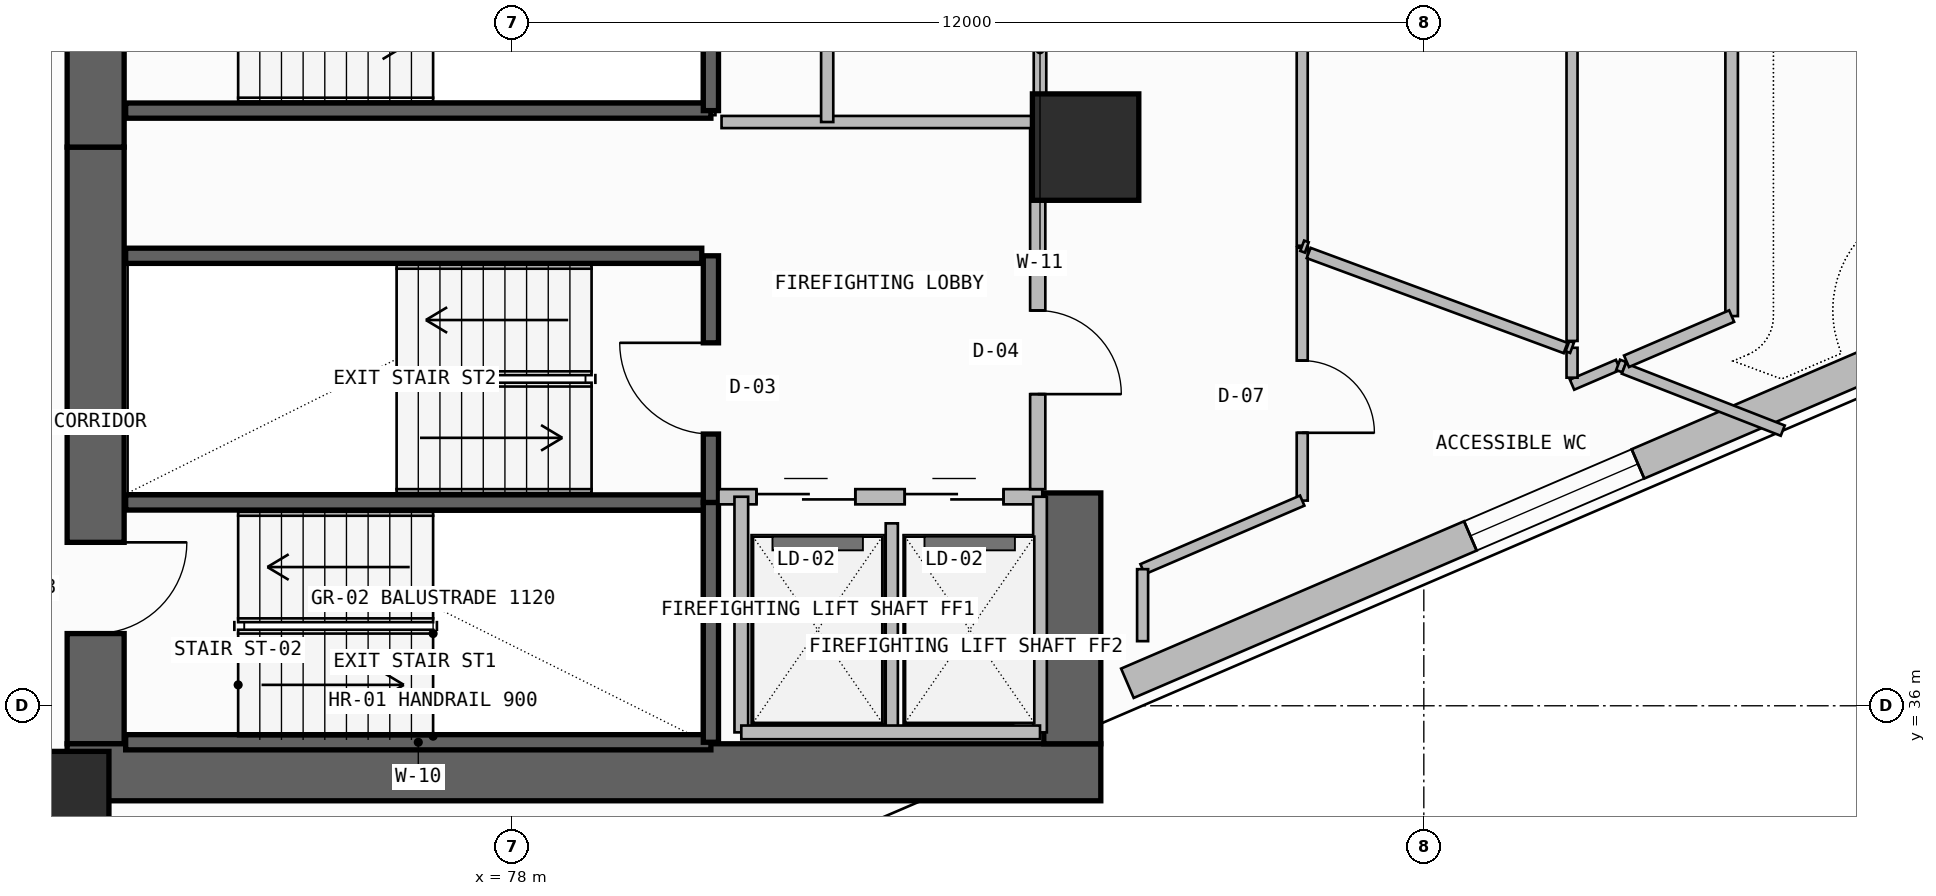
"""IFC4 building model, lengths in metres.
Left out: names, types, materials, properties, quantities, classifications, styles, units other than length and angle.
Written with IfcOpenShell. Run it as: python <this file> out.ifc"""

import sys

from ifc_helpers import new_model, si_unit, direction, frame, frame_2d, origin, origin_2d, place, context, subcontext, project, spatial, rectangle, extrude, element, fill, save


model = new_model("IFC4")
c1 = context("Model", 3, precision=1e-05, world=origin(), true_north=direction((0.0, 1.0)))
c2 = subcontext(c1, "Body", "Model", "MODEL_VIEW")
j1 = project(units=[si_unit("LENGTHUNIT", "METRE"), si_unit("PLANEANGLEUNIT", "RADIAN")], contexts=[c1])
p1 = place(None, origin())
s1 = spatial("IfcSite", under=j1, at=p1, CompositionType="ELEMENT")
p2 = place(p1, origin())
s2 = spatial("IfcBuilding", under=s1, at=p2, CompositionType="ELEMENT")
p3 = place(p2, frame((0.0, 0.0, 182.62)))
s3 = spatial("IfcBuildingStorey", under=s2, at=p3, CompositionType="ELEMENT", Elevation=182.62)
p4 = place(p3, frame((72.525, 35.5, -0.26), z_axis=(0.0, 0.0, 1.0), x_axis=(0.0, 1.0, 0.0)))
e1 = element("IfcWall", 1, at=p4, inside=s3, PredefinedType="SHEAR", context=c2, shape_type="SweptSolid", body=[
    extrude(rectangle(XDim=7.85, YDim=0.75, at=frame_2d((3.925, 0.0))), origin(), (0.0, 0.0, 1.0), 3.52),
])
p5 = place(p4, frame((1.45, 0.0, 0.26)))
e2 = element("IfcOpeningElement", 2, at=p5, cuts=e1, PredefinedType="OPENING", context=c2, shape_type="SweptSolid", body=[
    extrude(rectangle(XDim=1.2, YDim=2.2, at=frame_2d((0.6, 1.1))), frame((0.0, 0.385, 0.0), z_axis=(0.0, -1.0, 0.0), x_axis=(1.0, 0.0, 0.0)), (0.0, 0.0, 1.0), 0.77),
])
p6 = place(p3, frame((72.15, 35.125, -0.26), z_axis=(0.0, 0.0, 1.0), x_axis=(1.0, 0.0, 0.0)))
e3 = element("IfcWall", 3, at=p6, inside=s3, PredefinedType="SHEAR", context=c2, shape_type="SweptSolid", body=[
    extrude(rectangle(XDim=13.6, YDim=0.75, at=frame_2d((6.8, 0.0))), origin(), (0.0, 0.0, 1.0), 3.52),
])
p7 = place(p3, frame((85.375, 35.5, -0.26), z_axis=(0.0, 0.0, 1.0), x_axis=(0.0, 1.0, 0.0)))
e4 = element("IfcWall", 4, at=p7, inside=s3, PredefinedType="SHEAR", context=c2, shape_type="SweptSolid", body=[
    extrude(rectangle(XDim=3.3, YDim=0.75, at=frame_2d((1.65, 0.0))), origin(), (0.0, 0.0, 1.0), 3.52),
])
p8 = place(p3, frame((72.525, 43.35, -0.26), z_axis=(0.0, 0.0, 1.0), x_axis=(0.0, 1.0, 0.0)))
e5 = element("IfcWall", 5, at=p8, inside=s3, PredefinedType="SHEAR", context=c2, shape_type="SweptSolid", body=[
    extrude(rectangle(XDim=12.7, YDim=0.75, at=frame_2d((6.35, 0.0))), origin(), (0.0, 0.0, 1.0), 3.52),
])
p9 = place(p8, frame((1.35, 0.0, 0.26)))
e6 = element("IfcOpeningElement", 6, at=p9, cuts=e5, PredefinedType="OPENING", context=c2, shape_type="SweptSolid", body=[
    extrude(rectangle(XDim=1.2, YDim=2.2, at=frame_2d((0.6, 1.1))), frame((0.0, 0.385, 0.0), z_axis=(0.0, -1.0, 0.0), x_axis=(1.0, 0.0, 0.0)), (0.0, 0.0, 1.0), 0.77),
])
for number, where, z_axis, x_axis in (
    (7, (72.0, 34.7, 0.0), (0.0, 0.0, 1.0), (1.0, 0.0, 0.0)),
    (8, (85.55, 43.35, 0.0), (0.0, 0.0, 1.0), (1.0, 0.0, 0.0)),
):
    element("IfcColumn", number, at=place(p3, frame(where, z_axis=z_axis, x_axis=x_axis)), inside=s3, PredefinedType="COLUMN", context=c2, shape_type="SweptSolid", body=[
        extrude(rectangle(XDim=1.4, YDim=1.4, at=origin_2d()), origin(), (0.0, 0.0, 1.0), 3.52),
    ])
p10 = place(p3, frame((86.1, 36.296, 0.0), z_axis=(0.0, 0.0, 1.0), x_axis=(0.918792412723, 0.394741057306, 0.0)))
e9 = element("IfcWall", 9, at=p10, inside=s3, PredefinedType="SOLIDWALL", context=c2, shape_type="SweptSolid", body=[
    extrude(rectangle(XDim=11.794, YDim=0.42, at=frame_2d((5.897, 0.0))), origin(), (0.0, 0.0, 1.0), 2.245),
])
p11 = place(p10, frame((4.911, 0.0, 1.2)))
e10 = element("IfcOpeningElement", 10, at=p11, cuts=e9, PredefinedType="OPENING", context=c2, shape_type="SweptSolid", body=[
    extrude(rectangle(XDim=2.4, YDim=0.9, at=frame_2d((1.2, 0.45))), frame((0.0, 0.22, 0.0), z_axis=(0.0, -1.0, 0.0), x_axis=(1.0, 0.0, 0.0)), (0.0, 0.0, 1.0), 0.44),
])
for number, where, z_axis, x_axis in (
    (11, (72.92, 35.52, -0.26), (0.0, 0.0, 1.0), (1.0, 0.0, 0.0)),
    (12, (72.92, 38.675, -0.26), (0.0, 0.0, 1.0), (1.0, 0.0, 0.0)),
):
    element("IfcWall", number, at=place(p3, frame(where, z_axis=z_axis, x_axis=x_axis)), inside=s3, PredefinedType="SOLIDWALL", context=c2, shape_type="SweptSolid", body=[
        extrude(rectangle(XDim=7.7, YDim=0.2, at=frame_2d((3.85, 0.0))), origin(), (0.0, 0.0, 1.0), 3.52),
    ])
p12 = place(p3, frame((80.62, 35.52, -0.26), z_axis=(0.0, 0.0, 1.0), x_axis=(0.0, 1.0, 0.0)))
e13 = element("IfcWall", 13, at=p12, inside=s3, PredefinedType="SOLIDWALL", context=c2, shape_type="SweptSolid", body=[
    extrude(rectangle(XDim=3.155, YDim=0.2, at=frame_2d((1.578, 0.0))), origin(), (0.0, 0.0, 1.0), 3.52),
])
p13 = place(p3, frame((80.62, 38.675, -0.26), z_axis=(0.0, 0.0, 1.0), x_axis=(0.0, 1.0, 0.0)))
e14 = element("IfcWall", 14, at=p13, inside=s3, PredefinedType="SOLIDWALL", context=c2, shape_type="SweptSolid", body=[
    extrude(rectangle(XDim=3.245, YDim=0.2, at=frame_2d((1.623, 0.0))), origin(), (0.0, 0.0, 1.0), 3.52),
])
p14 = place(p13, frame((0.9, 0.0, 0.26)))
e15 = element("IfcOpeningElement", 15, at=p14, cuts=e14, PredefinedType="OPENING", context=c2, shape_type="SweptSolid", body=[
    extrude(rectangle(XDim=1.2, YDim=2.2, at=frame_2d((0.6, 1.1))), frame((0.0, 0.11, 0.0), z_axis=(0.0, -1.0, 0.0), x_axis=(1.0, 0.0, 0.0)), (0.0, 0.0, 1.0), 0.22),
])
p15 = place(p3, frame((80.72, 38.75, 0.0), z_axis=(0.0, 0.0, 1.0), x_axis=(1.0, 0.0, 0.0)))
e16 = element("IfcWall", 16, at=p15, inside=s3, PredefinedType="SOLIDWALL", context=c2, shape_type="SweptSolid", body=[
    extrude(rectangle(XDim=4.26, YDim=0.2, at=frame_2d((2.13, 0.0))), origin(), (0.0, 0.0, 1.0), 3.26),
])
p16 = place(p15, frame((0.5, 0.0, 0.0)))
e17 = element("IfcOpeningElement", 17, at=p16, cuts=e16, PredefinedType="OPENING", context=c2, shape_type="SweptSolid", body=[
    extrude(rectangle(XDim=1.3, YDim=2.3, at=frame_2d((0.65, 1.15))), frame((0.0, 0.11, 0.0), z_axis=(0.0, -1.0, 0.0), x_axis=(1.0, 0.0, 0.0)), (0.0, 0.0, 1.0), 0.22),
])
p17 = place(p15, frame((2.45, 0.0, 0.0)))
e18 = element("IfcOpeningElement", 18, at=p17, cuts=e16, PredefinedType="OPENING", context=c2, shape_type="SweptSolid", body=[
    extrude(rectangle(XDim=1.3, YDim=2.3, at=frame_2d((0.65, 1.15))), frame((0.0, 0.11, 0.0), z_axis=(0.0, -1.0, 0.0), x_axis=(1.0, 0.0, 0.0)), (0.0, 0.0, 1.0), 0.22),
])
p18 = place(p3, frame((83.0, 35.65, 0.0), z_axis=(0.0, 0.0, 1.0), x_axis=(0.0, 1.0, 0.0)))
e19 = element("IfcWall", 19, at=p18, inside=s3, PredefinedType="PLUMBINGWALL", context=c2, shape_type="SweptSolid", body=[
    extrude(rectangle(XDim=2.75, YDim=0.16, at=frame_2d((1.375, 0.0))), origin(), (0.0, 0.0, 1.0), 3.26),
])
for number, where, z_axis, x_axis in (
    (20, (84.95, 35.65, 0.0), (0.0, 0.0, 1.0), (0.0, 1.0, 0.0)),
    (21, (81.02, 35.65, 0.0), (0.0, 0.0, 1.0), (0.0, 1.0, 0.0)),
):
    element("IfcWall", number, at=place(p3, frame(where, z_axis=z_axis, x_axis=x_axis)), inside=s3, PredefinedType="SOLIDWALL", context=c2, shape_type="SweptSolid", body=[
        extrude(rectangle(XDim=3.1, YDim=0.18, at=frame_2d((1.55, 0.0))), origin(), (0.0, 0.0, 1.0), 3.26),
    ])
p19 = place(p3, frame((81.02, 35.65, 0.0), z_axis=(0.0, 0.0, 1.0), x_axis=(1.0, 0.0, 0.0)))
e22 = element("IfcWall", 22, at=p19, inside=s3, PredefinedType="SOLIDWALL", context=c2, shape_type="SweptSolid", body=[
    extrude(rectangle(XDim=3.93, YDim=0.18, at=frame_2d((1.965, 0.0))), origin(), (0.0, 0.0, 1.0), 3.26),
])
p20 = place(p3, frame((84.92, 38.85, 0.0), z_axis=(0.0, 0.0, 1.0), x_axis=(0.0, 1.0, 0.0)))
e23 = element("IfcWall", 23, at=p20, inside=s3, PredefinedType="SOLIDWALL", context=c2, shape_type="SweptSolid", body=[
    extrude(rectangle(XDim=4.83, YDim=0.2, at=frame_2d((2.415, 0.0))), origin(), (0.0, 0.0, 1.0), 3.26),
])
p21 = place(p20, frame((1.25, 0.0, 0.0)))
e24 = element("IfcOpeningElement", 24, at=p21, cuts=e23, PredefinedType="OPENING", context=c2, shape_type="SweptSolid", body=[
    extrude(rectangle(XDim=1.1, YDim=2.2, at=frame_2d((0.55, 1.1))), frame((0.0, 0.11, 0.0), z_axis=(0.0, -1.0, 0.0), x_axis=(1.0, 0.0, 0.0)), (0.0, 0.0, 1.0), 0.22),
])
p22 = place(p3, frame((72.92, 41.92, -0.26), z_axis=(0.0, 0.0, 1.0), x_axis=(1.0, 0.0, 0.0)))
e25 = element("IfcWall", 25, at=p22, inside=s3, PredefinedType="SOLIDWALL", context=c2, shape_type="SweptSolid", body=[
    extrude(rectangle(XDim=7.58, YDim=0.2, at=frame_2d((3.79, 0.0))), origin(), (0.0, 0.0, 1.0), 3.52),
])
p23 = place(p3, frame((72.92, 43.83, -0.26), z_axis=(0.0, 0.0, 1.0), x_axis=(1.0, 0.0, 0.0)))
e26 = element("IfcWall", 26, at=p23, inside=s3, PredefinedType="SOLIDWALL", context=c2, shape_type="SweptSolid", body=[
    extrude(rectangle(XDim=7.7, YDim=0.2, at=frame_2d((3.85, 0.0))), origin(), (0.0, 0.0, 1.0), 3.52),
])
p24 = place(p3, frame((80.62, 43.83, -0.26), z_axis=(0.0, 0.0, 1.0), x_axis=(0.0, 1.0, 0.0)))
e27 = element("IfcWall", 27, at=p24, inside=s3, PredefinedType="SOLIDWALL", context=c2, shape_type="SweptSolid", body=[
    extrude(rectangle(XDim=3.24, YDim=0.2, at=frame_2d((1.62, 0.0))), origin(), (0.0, 0.0, 1.0), 3.52),
])
p25 = place(p3, frame((84.95, 43.68, 0.0), z_axis=(0.0, 0.0, 1.0), x_axis=(0.0, 1.0, 0.0)))
e28 = element("IfcWall", 28, at=p25, inside=s3, PredefinedType="PLUMBINGWALL", context=c2, shape_type="SweptSolid", body=[
    extrude(rectangle(XDim=1.9, YDim=0.165, at=frame_2d((0.95, 0.0))), origin(), (0.0, 0.0, 1.0), 3.26),
])
p26 = place(p3, frame((80.76, 43.68, 0.0), z_axis=(0.0, 0.0, 1.0), x_axis=(1.0, 0.0, 0.0)))
e29 = element("IfcWall", 29, at=p26, inside=s3, PredefinedType="PLUMBINGWALL", context=c2, shape_type="SweptSolid", body=[
    extrude(rectangle(XDim=4.19, YDim=0.16, at=frame_2d((2.095, 0.0))), origin(), (0.0, 0.0, 1.0), 3.26),
])
p27 = place(p3, frame((82.15, 43.68, 0.0), z_axis=(0.0, 0.0, 1.0), x_axis=(0.0, 1.0, 0.0)))
e30 = element("IfcWall", 30, at=p27, inside=s3, PredefinedType="PLUMBINGWALL", context=c2, shape_type="SweptSolid", body=[
    extrude(rectangle(XDim=1.9, YDim=0.16, at=frame_2d((0.95, 0.0))), origin(), (0.0, 0.0, 1.0), 3.26),
])
p28 = place(p3, frame((88.4, 38.699, 0.0), z_axis=(0.0, 0.0, 1.0), x_axis=(0.0, 1.0, 0.0)))
e31 = element("IfcWall", 31, at=p28, inside=s3, PredefinedType="PARTITIONING", context=c2, shape_type="SweptSolid", body=[
    extrude(rectangle(XDim=3.327, YDim=0.145, at=frame_2d((1.664, 0.0))), origin(), (0.0, 0.0, 1.0), 3.26),
])
p29 = place(p28, frame((0.892, 0.0, 0.0)))
e32 = element("IfcOpeningElement", 32, at=p29, cuts=e31, PredefinedType="OPENING", context=c2, shape_type="SweptSolid", body=[
    extrude(rectangle(XDim=0.95, YDim=2.15, at=frame_2d((0.475, 1.075))), frame((0.0, 0.083, 0.0), z_axis=(0.0, -1.0, 0.0), x_axis=(1.0, 0.0, 0.0)), (0.0, 0.0, 1.0), 0.165),
])
p30 = place(p3, frame((86.3, 37.797, 0.0), z_axis=(0.0, 0.0, 1.0), x_axis=(0.918802105609, 0.39471849555, 0.0)))
e33 = element("IfcWall", 33, at=p30, inside=s3, PredefinedType="PARTITIONING", context=c2, shape_type="SweptSolid", body=[
    extrude(rectangle(XDim=2.285, YDim=0.145, at=frame_2d((1.143, 0.0))), origin(), (0.0, 0.0, 1.0), 3.26),
])
p31 = place(p3, frame((91.95, 40.225, 0.0), z_axis=(0.0, 0.0, 1.0), x_axis=(0.918761815861, 0.394812266421, 0.0)))
e34 = element("IfcWall", 34, at=p31, inside=s3, PredefinedType="PARTITIONING", context=c2, shape_type="SweptSolid", body=[
    extrude(rectangle(XDim=0.66, YDim=0.145, at=frame_2d((0.33, 0.0))), origin(), (0.0, 0.0, 1.0), 3.26),
])
p32 = place(p3, frame((91.95, 40.71, 0.0), z_axis=(0.0, 0.0, 1.0), x_axis=(0.0, -1.0, 0.0)))
e35 = element("IfcWall", 35, at=p32, inside=s3, PredefinedType="PARTITIONING", context=c2, shape_type="SweptSolid", body=[
    extrude(rectangle(XDim=0.393, YDim=0.145, at=frame_2d((0.197, 0.0))), origin(), (0.0, 0.0, 1.0), 3.26),
])
p33 = place(p3, frame((92.556, 40.485, 0.0), z_axis=(0.0, 0.0, 1.0), x_axis=(0.936559447389, -0.35050877522, 0.0)))
e36 = element("IfcWall", 36, at=p33, inside=s3, PredefinedType="PARTITIONING", context=c2, shape_type="SweptSolid", body=[
    extrude(rectangle(XDim=0.087, YDim=0.145, at=frame_2d((0.043, 0.0))), origin(), (0.0, 0.0, 1.0), 3.26),
])
p34 = place(p3, frame((91.89, 40.732, 0.0), z_axis=(0.0, 0.0, 1.0), x_axis=(0.9366417498, -0.350288784478, 0.0)))
e37 = element("IfcWall", 37, at=p34, inside=s3, PredefinedType="PARTITIONING", context=c2, shape_type="SweptSolid", body=[
    extrude(rectangle(XDim=0.064, YDim=0.145, at=frame_2d((0.032, 0.0))), origin(), (0.0, 0.0, 1.0), 3.26),
])
p35 = place(p3, frame((88.485, 41.957, 0.0), z_axis=(0.0, 0.0, 1.0), x_axis=(0.937944697407, -0.346784867903, 0.0)))
e38 = element("IfcWall", 38, at=p35, inside=s3, PredefinedType="PARTITIONING", context=c2, shape_type="SweptSolid", body=[
    extrude(rectangle(XDim=3.604, YDim=0.145, at=frame_2d((1.802, 0.0))), origin(), (0.0, 0.0, 1.0), 3.26),
])
p36 = place(p3, frame((92.631, 40.437, 0.0), z_axis=(0.0, 0.0, 1.0), x_axis=(0.931460804404, -0.363841682411, 0.0)))
e39 = element("IfcWall", 39, at=p36, inside=s3, PredefinedType="PARTITIONING", context=c2, shape_type="SweptSolid", body=[
    extrude(rectangle(XDim=2.245, YDim=0.145, at=frame_2d((1.123, 0.0))), origin(), (0.0, 0.0, 1.0), 3.26),
])
p37 = place(p3, frame((91.95, 50.283, 0.0), z_axis=(0.0, 0.0, 1.0), x_axis=(0.0, -1.0, 0.0)))
e40 = element("IfcWall", 40, at=p37, inside=s3, PredefinedType="PARTITIONING", context=c2, shape_type="SweptSolid", body=[
    extrude(rectangle(XDim=9.483, YDim=0.145, at=frame_2d((4.741, 0.0))), origin(), (0.0, 0.0, 1.0), 2.745),
])
p38 = place(p37, frame((4.292, 0.0, 0.0)))
e41 = element("IfcOpeningElement", 41, at=p38, cuts=e40, PredefinedType="OPENING", context=c2, shape_type="SweptSolid", body=[
    extrude(rectangle(XDim=0.9, YDim=2.1, at=frame_2d((0.45, 1.05))), frame((0.0, 0.083, 0.0), z_axis=(0.0, -1.0, 0.0), x_axis=(1.0, 0.0, 0.0)), (0.0, 0.0, 1.0), 0.165),
])
p39 = place(p3, frame((88.4, 42.052, 0.0), z_axis=(0.0, 0.0, 1.0), x_axis=(0.0, 1.0, 0.0)))
e42 = element("IfcWall", 42, at=p39, inside=s3, PredefinedType="PARTITIONING", context=c2, shape_type="SweptSolid", body=[
    extrude(rectangle(XDim=6.963, YDim=0.145, at=frame_2d((3.481, 0.0))), origin(), (0.0, 0.0, 1.0), 2.745),
])
p40 = place(p3, frame((88.46, 42.03, 0.0), z_axis=(0.0, 0.0, 1.0), x_axis=(-0.937886655879, 0.346941811727, 0.0)))
e43 = element("IfcWall", 43, at=p40, inside=s3, PredefinedType="PARTITIONING", context=c2, shape_type="SweptSolid", body=[
    extrude(rectangle(XDim=0.064, YDim=0.145, at=frame_2d((0.032, 0.0))), origin(), (0.0, 0.0, 1.0), 3.26),
])
p41 = place(p3, frame((94.05, 41.127, 0.0), z_axis=(0.0, 0.0, 1.0), x_axis=(0.0, 1.0, 0.0)))
e44 = element("IfcWall", 44, at=p41, inside=s3, PredefinedType="PARTITIONING", context=c2, shape_type="SweptSolid", body=[
    extrude(rectangle(XDim=9.906, YDim=0.165, at=frame_2d((4.953, 0.0))), origin(), (0.0, 0.0, 1.0), 2.745),
])
p42 = place(p41, frame((4.453, 0.0, 0.0)))
e45 = element("IfcOpeningElement", 45, at=p42, cuts=e44, PredefinedType="OPENING", context=c2, shape_type="SweptSolid", body=[
    extrude(rectangle(XDim=1.0, YDim=2.2, at=frame_2d((0.5, 1.1))), frame((0.0, 0.093, 0.0), z_axis=(0.0, -1.0, 0.0), x_axis=(1.0, 0.0, 0.0)), (0.0, 0.0, 1.0), 0.185),
])
p43 = place(p3, frame((92.667, 40.532, 0.0), z_axis=(0.0, 0.0, 1.0), x_axis=(0.918809189305, 0.394702006136, 0.0)))
e46 = element("IfcWall", 46, at=p43, inside=s3, PredefinedType="PARTITIONING", context=c2, shape_type="SweptSolid", body=[
    extrude(rectangle(XDim=1.506, YDim=0.165, at=frame_2d((0.753, 0.0))), origin(), (0.0, 0.0, 1.0), 3.26),
])
p44 = place(p3, frame((86.3, 36.85, 0.0), z_axis=(0.0, 0.0, 1.0), x_axis=(0.0, 1.0, 0.0)))
e47 = element("IfcWall", 47, at=p44, inside=s3, PredefinedType="PARTITIONING", context=c2, shape_type="SweptSolid", body=[
    extrude(rectangle(XDim=0.947, YDim=0.145, at=frame_2d((0.474, 0.0))), origin(), (0.0, 0.0, 1.0), 3.26),
])
p45 = place(p11, origin())
e48 = element("IfcWindow", 48, at=p45, inside=s3, PartitioningType="SINGLE_PANEL", PredefinedType="WINDOW", context=c2, shape_type="SweptSolid", body=[
    extrude(rectangle(XDim=2.4, YDim=0.9, at=frame_2d((1.2, 0.45))), frame((0.0, 0.03, 0.0), z_axis=(0.0, -1.0, 0.0), x_axis=(1.0, 0.0, 0.0)), (0.0, 0.0, 1.0), 0.06),
])
fill(e10, e48)
p46 = place(p5, frame((1.2, 0.0, 0.0), z_axis=(0.0, 0.0, 1.0), x_axis=(-1.0, 0.0, 0.0)))
e49 = element("IfcDoor", 49, at=p46, inside=s3, OperationType="SINGLE_SWING_LEFT", PredefinedType="USERDEFINED", context=c2, shape_type="SweptSolid", body=[
    extrude(rectangle(XDim=1.2, YDim=2.2, at=frame_2d((0.6, 1.1))), frame((0.0, 0.025, 0.0), z_axis=(0.0, -1.0, 0.0), x_axis=(1.0, 0.0, 0.0)), (0.0, 0.0, 1.0), 0.05),
])
fill(e2, e49)
p47 = place(p14, origin())
e50 = element("IfcDoor", 50, at=p47, inside=s3, OperationType="SINGLE_SWING_RIGHT", PredefinedType="USERDEFINED", context=c2, shape_type="SweptSolid", body=[
    extrude(rectangle(XDim=1.2, YDim=2.2, at=frame_2d((0.6, 1.1))), frame((0.0, 0.025, 0.0), z_axis=(0.0, -1.0, 0.0), x_axis=(1.0, 0.0, 0.0)), (0.0, 0.0, 1.0), 0.05),
])
fill(e15, e50)
p48 = place(p16, origin())
e51 = element("IfcDoor", 51, at=p48, inside=s3, OperationType="DOUBLE_DOOR_SLIDING", PredefinedType="DOOR", context=c2, shape_type="SweptSolid", body=[
    extrude(rectangle(XDim=1.3, YDim=2.3, at=frame_2d((0.65, 1.15))), frame((0.0, 0.025, 0.0), z_axis=(0.0, -1.0, 0.0), x_axis=(1.0, 0.0, 0.0)), (0.0, 0.0, 1.0), 0.05),
])
fill(e17, e51)
p49 = place(p17, origin())
e52 = element("IfcDoor", 52, at=p49, inside=s3, OperationType="DOUBLE_DOOR_SLIDING", PredefinedType="DOOR", context=c2, shape_type="SweptSolid", body=[
    extrude(rectangle(XDim=1.3, YDim=2.3, at=frame_2d((0.65, 1.15))), frame((0.0, 0.025, 0.0), z_axis=(0.0, -1.0, 0.0), x_axis=(1.0, 0.0, 0.0)), (0.0, 0.0, 1.0), 0.05),
])
fill(e18, e52)
p50 = place(p21, frame((1.1, 0.0, 0.0), z_axis=(0.0, 0.0, 1.0), x_axis=(-1.0, 0.0, 0.0)))
e53 = element("IfcDoor", 53, at=p50, inside=s3, OperationType="SINGLE_SWING_RIGHT", PredefinedType="DOOR", context=c2, shape_type="SweptSolid", body=[
    extrude(rectangle(XDim=1.1, YDim=2.2, at=frame_2d((0.55, 1.1))), frame((0.0, 0.025, 0.0), z_axis=(0.0, -1.0, 0.0), x_axis=(1.0, 0.0, 0.0)), (0.0, 0.0, 1.0), 0.05),
])
fill(e24, e53)
p51 = place(p29, frame((0.95, 0.0, 0.0), z_axis=(0.0, 0.0, 1.0), x_axis=(-1.0, 0.0, 0.0)))
e54 = element("IfcDoor", 54, at=p51, inside=s3, OperationType="SINGLE_SWING_RIGHT", PredefinedType="DOOR", context=c2, shape_type="SweptSolid", body=[
    extrude(rectangle(XDim=0.95, YDim=2.15, at=frame_2d((0.475, 1.075))), frame((0.0, 0.025, 0.0), z_axis=(0.0, -1.0, 0.0), x_axis=(1.0, 0.0, 0.0)), (0.0, 0.0, 1.0), 0.05),
])
fill(e32, e54)
save(model, sys.argv[1])
